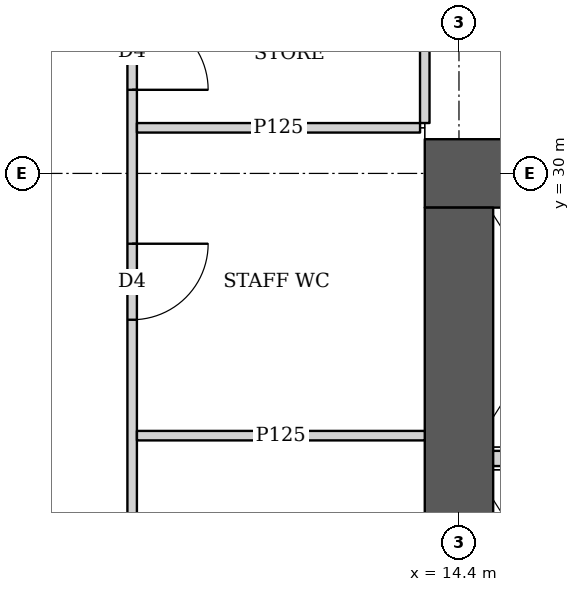
"""IFC4 building model, lengths in metres.
Left out: names, types, materials, properties, quantities, classifications, styles, units other than length and angle.
Written with IfcOpenShell. Run it as: python <this file> out.ifc"""

import sys

from ifc_helpers import new_model, si_unit, direction, frame, frame_2d, origin, place, context, subcontext, project, spatial, rectangle, extrude, element, fill, save


model = new_model("IFC4")
c1 = context("Model", 3, precision=1e-05, world=origin(), true_north=direction((0.0, 1.0)))
c2 = subcontext(c1, "Body", "Model", "MODEL_VIEW")
j1 = project(units=[si_unit("LENGTHUNIT", "METRE"), si_unit("PLANEANGLEUNIT", "RADIAN")], contexts=[c1])
p1 = place(None, origin())
s1 = spatial("IfcSite", under=j1, at=p1, CompositionType="ELEMENT")
p2 = place(p1, origin())
s2 = spatial("IfcBuilding", under=s1, at=p2, CompositionType="ELEMENT")
p3 = place(p2, frame((0.0, 0.0, 10.1)))
s3 = spatial("IfcBuildingStorey", under=s2, at=p3, CompositionType="ELEMENT", Elevation=10.1)
p4 = place(p3, frame((13.95, 30.0, 0.0), z_axis=(0.0, 0.0, 1.0), x_axis=(1.0, 0.0, 0.0)))
e1 = element("IfcWall", 1, at=p4, inside=s3, PredefinedType="SHEAR", context=c2, shape_type="SweptSolid", body=[
    extrude(rectangle(XDim=15.3, YDim=0.9, at=frame_2d((7.65, 0.0))), origin(), (0.0, 0.0, 1.0), 4.5),
])
p5 = place(p4, frame((4.45, 0.0, 0.0)))
e2 = element("IfcOpeningElement", 2, at=p5, cuts=e1, PredefinedType="OPENING", context=c2, shape_type="SweptSolid", body=[
    extrude(rectangle(XDim=1.8, YDim=2.1, at=frame_2d((0.9, 1.05))), frame((0.0, 0.46, 0.0), z_axis=(0.0, -1.0, 0.0), x_axis=(1.0, 0.0, 0.0)), (0.0, 0.0, 1.0), 0.92),
])
p6 = place(p4, frame((10.7, 0.0, 0.0)))
e3 = element("IfcOpeningElement", 3, at=p6, cuts=e1, PredefinedType="OPENING", context=c2, shape_type="SweptSolid", body=[
    extrude(rectangle(XDim=1.1, YDim=2.1, at=frame_2d((0.55, 1.05))), frame((0.0, 0.46, 0.0), z_axis=(0.0, -1.0, 0.0), x_axis=(1.0, 0.0, 0.0)), (0.0, 0.0, 1.0), 0.92),
])
p7 = place(p3, frame((14.4, 15.45, 0.0), z_axis=(0.0, 0.0, 1.0), x_axis=(0.0, 1.0, 0.0)))
e4 = element("IfcWall", 4, at=p7, inside=s3, PredefinedType="SHEAR", context=c2, shape_type="SweptSolid", body=[
    extrude(rectangle(XDim=14.1, YDim=0.9, at=frame_2d((7.05, 0.0))), origin(), (0.0, 0.0, 1.0), 4.5),
])
p8 = place(p3, frame((10.1, 10.05, 0.0), z_axis=(0.0, 0.0, 1.0), x_axis=(0.0, 1.0, 0.0)))
e5 = element("IfcWall", 5, at=p8, inside=s3, PredefinedType="PARTITIONING", context=c2, shape_type="SweptSolid", body=[
    extrude(rectangle(XDim=24.9, YDim=0.125, at=frame_2d((12.45, 0.0))), origin(), (0.0, 0.0, 1.0), 2.6),
])
p9 = place(p8, frame((1.675, 0.0, 0.0)))
e6 = element("IfcOpeningElement", 6, at=p9, cuts=e5, PredefinedType="OPENING", context=c2, shape_type="SweptSolid", body=[
    extrude(rectangle(XDim=1.0, YDim=2.1, at=frame_2d((0.5, 1.05))), frame((0.0, 0.073, 0.0), z_axis=(0.0, -1.0, 0.0), x_axis=(1.0, 0.0, 0.0)), (0.0, 0.0, 1.0), 0.145),
])
p10 = place(p8, frame((5.85, 0.0, 0.0)))
e7 = element("IfcOpeningElement", 7, at=p10, cuts=e5, PredefinedType="OPENING", context=c2, shape_type="SweptSolid", body=[
    extrude(rectangle(XDim=1.0, YDim=2.1, at=frame_2d((0.5, 1.05))), frame((0.0, 0.073, 0.0), z_axis=(0.0, -1.0, 0.0), x_axis=(1.0, 0.0, 0.0)), (0.0, 0.0, 1.0), 0.145),
])
p11 = place(p8, frame((8.975, 0.0, 0.0)))
e8 = element("IfcOpeningElement", 8, at=p11, cuts=e5, PredefinedType="OPENING", context=c2, shape_type="SweptSolid", body=[
    extrude(rectangle(XDim=1.0, YDim=2.1, at=frame_2d((0.5, 1.05))), frame((0.0, 0.073, 0.0), z_axis=(0.0, -1.0, 0.0), x_axis=(1.0, 0.0, 0.0)), (0.0, 0.0, 1.0), 0.145),
])
p12 = place(p8, frame((11.025, 0.0, 0.0)))
e9 = element("IfcOpeningElement", 9, at=p12, cuts=e5, PredefinedType="OPENING", context=c2, shape_type="SweptSolid", body=[
    extrude(rectangle(XDim=1.0, YDim=2.1, at=frame_2d((0.5, 1.05))), frame((0.0, 0.073, 0.0), z_axis=(0.0, -1.0, 0.0), x_axis=(1.0, 0.0, 0.0)), (0.0, 0.0, 1.0), 0.145),
])
p13 = place(p8, frame((13.975, 0.0, 0.0)))
e10 = element("IfcOpeningElement", 10, at=p13, cuts=e5, PredefinedType="OPENING", context=c2, shape_type="SweptSolid", body=[
    extrude(rectangle(XDim=1.0, YDim=2.1, at=frame_2d((0.5, 1.05))), frame((0.0, 0.073, 0.0), z_axis=(0.0, -1.0, 0.0), x_axis=(1.0, 0.0, 0.0)), (0.0, 0.0, 1.0), 0.145),
])
p14 = place(p8, frame((18.025, 0.0, 0.0)))
e11 = element("IfcOpeningElement", 11, at=p14, cuts=e5, PredefinedType="OPENING", context=c2, shape_type="SweptSolid", body=[
    extrude(rectangle(XDim=1.0, YDim=2.1, at=frame_2d((0.5, 1.05))), frame((0.0, 0.073, 0.0), z_axis=(0.0, -1.0, 0.0), x_axis=(1.0, 0.0, 0.0)), (0.0, 0.0, 1.0), 0.145),
])
p15 = place(p8, frame((21.05, 0.0, 0.0)))
e12 = element("IfcOpeningElement", 12, at=p15, cuts=e5, PredefinedType="OPENING", context=c2, shape_type="SweptSolid", body=[
    extrude(rectangle(XDim=1.0, YDim=2.1, at=frame_2d((0.5, 1.05))), frame((0.0, 0.073, 0.0), z_axis=(0.0, -1.0, 0.0), x_axis=(1.0, 0.0, 0.0)), (0.0, 0.0, 1.0), 0.145),
])
p16 = place(p8, frame((23.225, 0.0, 0.0)))
e13 = element("IfcOpeningElement", 13, at=p16, cuts=e5, PredefinedType="OPENING", context=c2, shape_type="SweptSolid", body=[
    extrude(rectangle(XDim=1.0, YDim=2.1, at=frame_2d((0.5, 1.05))), frame((0.0, 0.073, 0.0), z_axis=(0.0, -1.0, 0.0), x_axis=(1.0, 0.0, 0.0)), (0.0, 0.0, 1.0), 0.145),
])
p17 = place(p3, frame((10.163, 30.6, 0.0), z_axis=(0.0, 0.0, 1.0), x_axis=(1.0, 0.0, 0.0)))
e14 = element("IfcWall", 14, at=p17, inside=s3, PredefinedType="PARTITIONING", context=c2, shape_type="SweptSolid", body=[
    extrude(rectangle(XDim=3.725, YDim=0.125, at=frame_2d((1.862, 0.0))), origin(), (0.0, 0.0, 1.0), 2.6),
])
p18 = place(p3, frame((13.95, 30.663, 0.0), z_axis=(0.0, 0.0, 1.0), x_axis=(0.0, 1.0, 0.0)))
e15 = element("IfcWall", 15, at=p18, inside=s3, PredefinedType="PARTITIONING", context=c2, shape_type="SweptSolid", body=[
    extrude(rectangle(XDim=4.174, YDim=0.125, at=frame_2d((2.087, 0.0))), origin(), (0.0, 0.0, 1.0), 2.6),
])
p19 = place(p3, frame((10.163, 26.55, 0.0), z_axis=(0.0, 0.0, 1.0), x_axis=(1.0, 0.0, 0.0)))
e16 = element("IfcWall", 16, at=p19, inside=s3, PredefinedType="PARTITIONING", context=c2, shape_type="SweptSolid", body=[
    extrude(rectangle(XDim=3.787, YDim=0.125, at=frame_2d((1.894, 0.0))), origin(), (0.0, 0.0, 1.0), 4.2),
])
p20 = place(p3, frame((14.85, 26.25, 0.0), z_axis=(0.0, 0.0, 1.0), x_axis=(1.0, 0.0, 0.0)))
e17 = element("IfcWall", 17, at=p20, inside=s3, PredefinedType="SOLIDWALL", context=c2, shape_type="SweptSolid", body=[
    extrude(rectangle(XDim=1.95, YDim=0.2, at=frame_2d((0.975, 0.0))), origin(), (0.0, 0.0, 1.0), 4.2),
])
p21 = place(p14, origin())
e18 = element("IfcDoor", 18, at=p21, inside=s3, OperationType="SINGLE_SWING_LEFT", PredefinedType="DOOR", context=c2, shape_type="SweptSolid", body=[
    extrude(rectangle(XDim=1.0, YDim=2.1, at=frame_2d((0.5, 1.05))), frame((0.0, 0.025, 0.0), z_axis=(0.0, -1.0, 0.0), x_axis=(1.0, 0.0, 0.0)), (0.0, 0.0, 1.0), 0.05),
])
fill(e11, e18)
p22 = place(p15, origin())
e19 = element("IfcDoor", 19, at=p22, inside=s3, OperationType="SINGLE_SWING_RIGHT", PredefinedType="DOOR", context=c2, shape_type="SweptSolid", body=[
    extrude(rectangle(XDim=1.0, YDim=2.1, at=frame_2d((0.5, 1.05))), frame((0.0, 0.025, 0.0), z_axis=(0.0, -1.0, 0.0), x_axis=(1.0, 0.0, 0.0)), (0.0, 0.0, 1.0), 0.05),
])
fill(e12, e19)
save(model, sys.argv[1])
